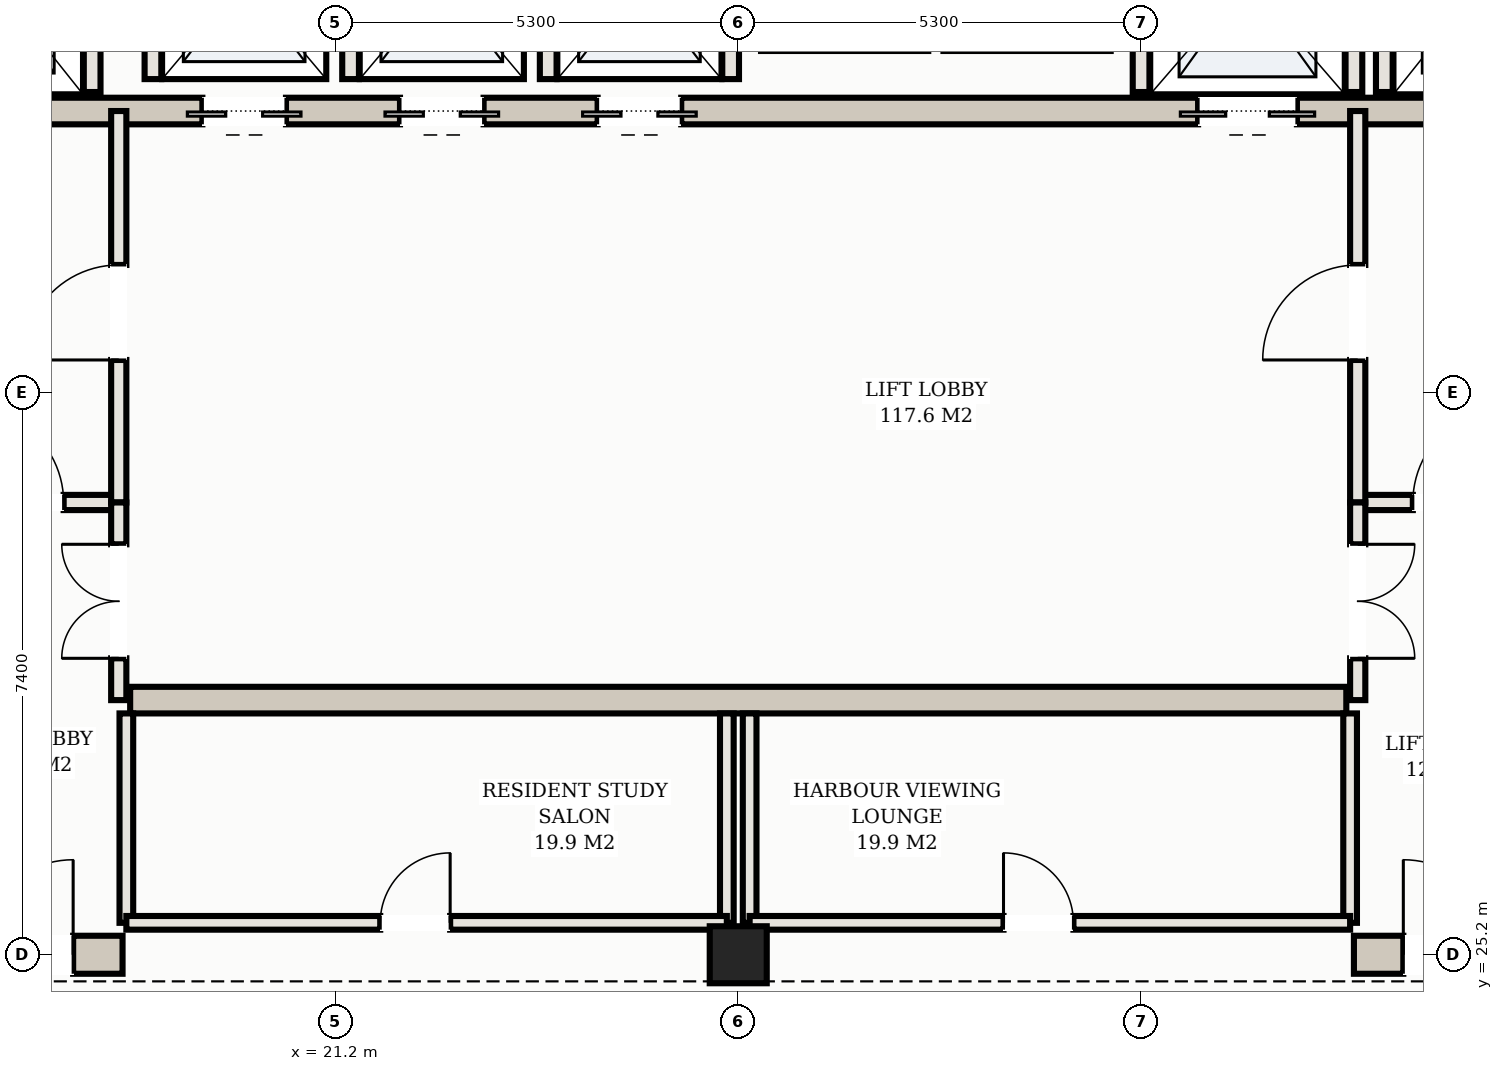
"""IFC4 building model, lengths in metres.
Left out: names, types, materials, properties, quantities, classifications, styles, units other than length and angle.
Written with IfcOpenShell. Run it as: python <this file> out.ifc"""

import sys

from ifc_helpers import new_model, si_unit, direction, frame, frame_2d, origin, origin_2d, place, context, subcontext, project, spatial, rectangle, hollow_rectangle, extrude, element, fill, save


model = new_model("IFC4")
c1 = context("Model", 3, precision=1e-05, world=origin(), true_north=direction((0.0, 1.0)))
c2 = subcontext(c1, "Body", "Model", "MODEL_VIEW")
j1 = project(units=[si_unit("LENGTHUNIT", "METRE"), si_unit("PLANEANGLEUNIT", "RADIAN")], contexts=[c1])
p1 = place(None, origin())
s1 = spatial("IfcSite", under=j1, at=p1, CompositionType="ELEMENT")
p2 = place(p1, origin())
s2 = spatial("IfcBuilding", under=s1, at=p2, CompositionType="ELEMENT")
p3 = place(p2, frame((0.0, 0.0, 219.8)))
s3 = spatial("IfcBuildingStorey", under=s2, at=p3, CompositionType="ELEMENT", Elevation=219.8)
p4 = place(p3, frame((10.35, 25.2, 0.0), z_axis=(0.0, 0.0, 1.0), x_axis=(1.0, 0.0, 0.0)))
e1 = element("IfcWall", 1, at=p4, inside=s3, PredefinedType="SHEAR", context=c2, shape_type="SweptSolid", body=[
    extrude(rectangle(XDim=8.05, YDim=0.5, at=frame_2d((4.025, 0.0))), origin(), (0.0, 0.0, 1.0), 3.11),
])
p5 = place(p4, frame((6.15, 0.0, 0.0)))
e2 = element("IfcOpeningElement", 2, at=p5, cuts=e1, PredefinedType="OPENING", context=c2, shape_type="SweptSolid", body=[
    extrude(rectangle(XDim=1.25, YDim=2.2, at=frame_2d((0.625, 1.1))), frame((0.0, 0.26, 0.0), z_axis=(0.0, -1.0, 0.0), x_axis=(1.0, 0.0, 0.0)), (0.0, 0.0, 1.0), 0.52),
])
p6 = place(p3, frame((34.6, 25.2, 0.0), z_axis=(0.0, 0.0, 1.0), x_axis=(1.0, 0.0, 0.0)))
e3 = element("IfcWall", 3, at=p6, inside=s3, PredefinedType="SHEAR", context=c2, shape_type="SweptSolid", body=[
    extrude(rectangle(XDim=8.05, YDim=0.5, at=frame_2d((4.025, 0.0))), origin(), (0.0, 0.0, 1.0), 3.11),
])
p7 = place(p6, frame((0.65, 0.0, 0.0)))
e4 = element("IfcOpeningElement", 4, at=p7, cuts=e3, PredefinedType="OPENING", context=c2, shape_type="SweptSolid", body=[
    extrude(rectangle(XDim=1.25, YDim=2.2, at=frame_2d((0.625, 1.1))), frame((0.0, 0.26, 0.0), z_axis=(0.0, -1.0, 0.0), x_axis=(1.0, 0.0, 0.0)), (0.0, 0.0, 1.0), 0.52),
])
p8 = place(p3, frame((15.5, 36.3, 0.0), z_axis=(0.0, 0.0, 1.0), x_axis=(1.0, 0.0, 0.0)))
e5 = element("IfcWall", 5, at=p8, inside=s3, PredefinedType="SHEAR", context=c2, shape_type="SweptSolid", body=[
    extrude(rectangle(XDim=22.0, YDim=0.35, at=frame_2d((11.0, 0.0))), origin(), (0.0, 0.0, 1.0), 3.11),
])
p9 = place(p8, frame((0.65, 0.0, 0.0)))
e6 = element("IfcOpeningElement", 6, at=p9, cuts=e5, PredefinedType="OPENING", context=c2, shape_type="SweptSolid", body=[
    extrude(rectangle(XDim=1.1, YDim=2.15, at=frame_2d((0.55, 1.075))), frame((0.0, 0.185, 0.0), z_axis=(0.0, -1.0, 0.0), x_axis=(1.0, 0.0, 0.0)), (0.0, 0.0, 1.0), 0.37),
])
p10 = place(p8, frame((20.25, 0.0, 0.0)))
e7 = element("IfcOpeningElement", 7, at=p10, cuts=e5, PredefinedType="OPENING", context=c2, shape_type="SweptSolid", body=[
    extrude(rectangle(XDim=1.1, YDim=2.15, at=frame_2d((0.55, 1.075))), frame((0.0, 0.185, 0.0), z_axis=(0.0, -1.0, 0.0), x_axis=(1.0, 0.0, 0.0)), (0.0, 0.0, 1.0), 0.37),
])
p11 = place(p8, frame((17.05, 0.0, 0.0)))
e8 = element("IfcOpeningElement", 8, at=p11, cuts=e5, PredefinedType="OPENING", context=c2, shape_type="SweptSolid", body=[
    extrude(rectangle(XDim=1.3, YDim=2.2, at=frame_2d((0.65, 1.1))), frame((0.0, 0.185, 0.0), z_axis=(0.0, -1.0, 0.0), x_axis=(1.0, 0.0, 0.0)), (0.0, 0.0, 1.0), 0.37),
])
p12 = place(p8, frame((3.95, 0.0, 0.0)))
e9 = element("IfcOpeningElement", 9, at=p12, cuts=e5, PredefinedType="OPENING", context=c2, shape_type="SweptSolid", body=[
    extrude(rectangle(XDim=1.1, YDim=2.15, at=frame_2d((0.55, 1.075))), frame((0.0, 0.185, 0.0), z_axis=(0.0, -1.0, 0.0), x_axis=(1.0, 0.0, 0.0)), (0.0, 0.0, 1.0), 0.37),
])
p13 = place(p8, frame((6.55, 0.0, 0.0)))
e10 = element("IfcOpeningElement", 10, at=p13, cuts=e5, PredefinedType="OPENING", context=c2, shape_type="SweptSolid", body=[
    extrude(rectangle(XDim=1.1, YDim=2.15, at=frame_2d((0.55, 1.075))), frame((0.0, 0.185, 0.0), z_axis=(0.0, -1.0, 0.0), x_axis=(1.0, 0.0, 0.0)), (0.0, 0.0, 1.0), 0.37),
])
p14 = place(p8, frame((9.15, 0.0, 0.0)))
e11 = element("IfcOpeningElement", 11, at=p14, cuts=e5, PredefinedType="OPENING", context=c2, shape_type="SweptSolid", body=[
    extrude(rectangle(XDim=1.1, YDim=2.15, at=frame_2d((0.55, 1.075))), frame((0.0, 0.185, 0.0), z_axis=(0.0, -1.0, 0.0), x_axis=(1.0, 0.0, 0.0)), (0.0, 0.0, 1.0), 0.37),
])
p15 = place(p3, frame((18.5, 28.55, 0.0), z_axis=(0.0, 0.0, 1.0), x_axis=(1.0, 0.0, 0.0)))
e12 = element("IfcWall", 12, at=p15, inside=s3, PredefinedType="SHEAR", context=c2, shape_type="SweptSolid", body=[
    extrude(rectangle(XDim=16.0, YDim=0.35, at=frame_2d((8.0, 0.0))), origin(), (0.0, 0.0, 1.0), 3.11),
])
p16 = place(p3, frame((26.5, 25.2, 0.0), z_axis=(0.0, 0.0, 1.0), x_axis=(1.0, 0.0, 0.0)))
e13 = element("IfcColumn", 13, at=p16, inside=s3, PredefinedType="COLUMN", context=c2, shape_type="SweptSolid", body=[
    extrude(hollow_rectangle(XDim=0.75, YDim=0.75, WallThickness=0.025, at=origin_2d()), origin(), (0.0, 0.0, 1.0), 3.3),
])
for number, where, z_axis, x_axis in (
    (14, (18.0, 36.55, 0.0), (0.0, 0.0, 1.0), (0.0, 1.0, 0.0)),
    (15, (35.0, 36.55, 0.0), (0.0, 0.0, 1.0), (0.0, 1.0, 0.0)),
    (16, (31.8, 36.55, 0.0), (0.0, 0.0, 1.0), (0.0, 1.0, 0.0)),
    (17, (34.6, 36.55, 0.0), (0.0, 0.0, 1.0), (0.0, 1.0, 0.0)),
):
    element("IfcWall", number, at=place(p3, frame(where, z_axis=z_axis, x_axis=x_axis)), inside=s3, PredefinedType="SOLIDWALL", context=c2, shape_type="SweptSolid", body=[
        extrude(rectangle(XDim=2.93, YDim=0.22, at=frame_2d((1.465, 0.0))), origin(), (0.0, 0.0, 1.0), 3.11),
    ])
for number, where, z_axis, x_axis in (
    (18, (18.8, 36.72, 0.0), (0.0, 0.0, 1.0), (0.0, 1.0, 0.0)),
    (19, (21.4, 36.72, 0.0), (0.0, 0.0, 1.0), (0.0, 1.0, 0.0)),
    (20, (24.0, 36.72, 0.0), (0.0, 0.0, 1.0), (0.0, 1.0, 0.0)),
    (21, (26.4, 36.72, 0.0), (0.0, 0.0, 1.0), (0.0, 1.0, 0.0)),
):
    element("IfcWall", number, at=place(p3, frame(where, z_axis=z_axis, x_axis=x_axis)), inside=s3, PredefinedType="SOLIDWALL", context=c2, shape_type="SweptSolid", body=[
        extrude(rectangle(XDim=2.56, YDim=0.22, at=frame_2d((1.28, 0.0))), origin(), (0.0, 0.0, 1.0), 3.11),
    ])
p17 = place(p3, frame((15.1, 31.15, 0.0), z_axis=(0.0, 0.0, 1.0), x_axis=(1.0, 0.0, 0.0)))
e22 = element("IfcWall", 22, at=p17, inside=s3, PredefinedType="PARTITIONING", context=c2, shape_type="SweptSolid", body=[
    extrude(rectangle(XDim=3.25, YDim=0.2, at=frame_2d((1.625, 0.0))), origin(), (0.0, 0.0, 1.0), 2.43),
])
p18 = place(p17, frame((1.275, 0.0, 0.0)))
e23 = element("IfcOpeningElement", 23, at=p18, cuts=e22, PredefinedType="OPENING", context=c2, shape_type="SweptSolid", body=[
    extrude(rectangle(XDim=1.25, YDim=2.2, at=frame_2d((0.625, 1.1))), frame((0.0, 0.11, 0.0), z_axis=(0.0, -1.0, 0.0), x_axis=(1.0, 0.0, 0.0)), (0.0, 0.0, 1.0), 0.22),
])
p19 = place(p3, frame((18.35, 31.15, 0.0), z_axis=(0.0, 0.0, 1.0), x_axis=(0.0, 1.0, 0.0)))
e24 = element("IfcWall", 24, at=p19, inside=s3, PredefinedType="PARTITIONING", context=c2, shape_type="SweptSolid", body=[
    extrude(rectangle(XDim=5.15, YDim=0.2, at=frame_2d((2.575, 0.0))), origin(), (0.0, 0.0, 1.0), 2.43),
])
p20 = place(p19, frame((1.875, 0.0, 0.0)))
e25 = element("IfcOpeningElement", 25, at=p20, cuts=e24, PredefinedType="OPENING", context=c2, shape_type="SweptSolid", body=[
    extrude(rectangle(XDim=1.25, YDim=2.2, at=frame_2d((0.625, 1.1))), frame((0.0, 0.11, 0.0), z_axis=(0.0, -1.0, 0.0), x_axis=(1.0, 0.0, 0.0)), (0.0, 0.0, 1.0), 0.22),
])
p21 = place(p3, frame((34.65, 31.15, 0.0), z_axis=(0.0, 0.0, 1.0), x_axis=(1.0, 0.0, 0.0)))
e26 = element("IfcWall", 26, at=p21, inside=s3, PredefinedType="PARTITIONING", context=c2, shape_type="SweptSolid", body=[
    extrude(rectangle(XDim=3.25, YDim=0.2, at=frame_2d((1.625, 0.0))), origin(), (0.0, 0.0, 1.0), 2.43),
])
p22 = place(p21, frame((0.725, 0.0, 0.0)))
e27 = element("IfcOpeningElement", 27, at=p22, cuts=e26, PredefinedType="OPENING", context=c2, shape_type="SweptSolid", body=[
    extrude(rectangle(XDim=1.25, YDim=2.2, at=frame_2d((0.625, 1.1))), frame((0.0, 0.11, 0.0), z_axis=(0.0, -1.0, 0.0), x_axis=(1.0, 0.0, 0.0)), (0.0, 0.0, 1.0), 0.22),
])
p23 = place(p3, frame((34.65, 31.15, 0.0), z_axis=(0.0, 0.0, 1.0), x_axis=(0.0, 1.0, 0.0)))
e28 = element("IfcWall", 28, at=p23, inside=s3, PredefinedType="PARTITIONING", context=c2, shape_type="SweptSolid", body=[
    extrude(rectangle(XDim=5.15, YDim=0.2, at=frame_2d((2.575, 0.0))), origin(), (0.0, 0.0, 1.0), 2.43),
])
p24 = place(p23, frame((1.875, 0.0, 0.0)))
e29 = element("IfcOpeningElement", 29, at=p24, cuts=e28, PredefinedType="OPENING", context=c2, shape_type="SweptSolid", body=[
    extrude(rectangle(XDim=1.25, YDim=2.2, at=frame_2d((0.625, 1.1))), frame((0.0, 0.11, 0.0), z_axis=(0.0, -1.0, 0.0), x_axis=(1.0, 0.0, 0.0)), (0.0, 0.0, 1.0), 0.22),
])
p25 = place(p3, frame((18.35, 28.55, 0.0), z_axis=(0.0, 0.0, 1.0), x_axis=(0.0, 1.0, 0.0)))
e30 = element("IfcWall", 30, at=p25, inside=s3, PredefinedType="PARTITIONING", context=c2, shape_type="SweptSolid", body=[
    extrude(rectangle(XDim=2.6, YDim=0.2, at=frame_2d((1.3, 0.0))), origin(), (0.0, 0.0, 1.0), 2.43),
])
p26 = place(p25, frame((0.55, 0.0, 0.0)))
e31 = element("IfcOpeningElement", 31, at=p26, cuts=e30, PredefinedType="OPENING", context=c2, shape_type="SweptSolid", body=[
    extrude(rectangle(XDim=1.5, YDim=2.25, at=frame_2d((0.75, 1.125))), frame((0.0, 0.11, 0.0), z_axis=(0.0, -1.0, 0.0), x_axis=(1.0, 0.0, 0.0)), (0.0, 0.0, 1.0), 0.22),
])
p27 = place(p3, frame((34.65, 28.55, 0.0), z_axis=(0.0, 0.0, 1.0), x_axis=(0.0, 1.0, 0.0)))
e32 = element("IfcWall", 32, at=p27, inside=s3, PredefinedType="PARTITIONING", context=c2, shape_type="SweptSolid", body=[
    extrude(rectangle(XDim=2.6, YDim=0.2, at=frame_2d((1.3, 0.0))), origin(), (0.0, 0.0, 1.0), 2.43),
])
p28 = place(p27, frame((0.55, 0.0, 0.0)))
e33 = element("IfcOpeningElement", 33, at=p28, cuts=e32, PredefinedType="OPENING", context=c2, shape_type="SweptSolid", body=[
    extrude(rectangle(XDim=1.5, YDim=2.25, at=frame_2d((0.75, 1.125))), frame((0.0, 0.11, 0.0), z_axis=(0.0, -1.0, 0.0), x_axis=(1.0, 0.0, 0.0)), (0.0, 0.0, 1.0), 0.22),
])
for number, where, z_axis, x_axis in (
    (34, (18.45, 25.62, 0.0), (0.0, 0.0, 1.0), (0.0, 1.0, 0.0)),
    (35, (26.35, 25.62, 0.0), (0.0, 0.0, 1.0), (0.0, 1.0, 0.0)),
):
    element("IfcWall", number, at=place(p3, frame(where, z_axis=z_axis, x_axis=x_axis)), inside=s3, PredefinedType="PARTITIONING", context=c2, shape_type="SweptSolid", body=[
        extrude(rectangle(XDim=2.755, YDim=0.18, at=frame_2d((1.377, 0.0))), origin(), (0.0, 0.0, 1.0), 2.43),
    ])
p29 = place(p3, frame((18.45, 25.62, 0.0), z_axis=(0.0, 0.0, 1.0), x_axis=(1.0, 0.0, 0.0)))
e36 = element("IfcWall", 36, at=p29, inside=s3, PredefinedType="PARTITIONING", context=c2, shape_type="SweptSolid", body=[
    extrude(rectangle(XDim=7.9, YDim=0.18, at=frame_2d((3.95, 0.0))), origin(), (0.0, 0.0, 1.0), 2.43),
])
p30 = place(p29, frame((3.34, 0.0, 0.0)))
e37 = element("IfcOpeningElement", 37, at=p30, cuts=e36, PredefinedType="OPENING", context=c2, shape_type="SweptSolid", body=[
    extrude(rectangle(XDim=0.92, YDim=2.15, at=frame_2d((0.46, 1.075))), frame((0.0, 0.1, 0.0), z_axis=(0.0, -1.0, 0.0), x_axis=(1.0, 0.0, 0.0)), (0.0, 0.0, 1.0), 0.2),
])
for number, where, z_axis, x_axis in (
    (38, (26.65, 25.62, 0.0), (0.0, 0.0, 1.0), (0.0, 1.0, 0.0)),
    (39, (34.55, 25.62, 0.0), (0.0, 0.0, 1.0), (0.0, 1.0, 0.0)),
):
    element("IfcWall", number, at=place(p3, frame(where, z_axis=z_axis, x_axis=x_axis)), inside=s3, PredefinedType="PARTITIONING", context=c2, shape_type="SweptSolid", body=[
        extrude(rectangle(XDim=2.755, YDim=0.18, at=frame_2d((1.377, 0.0))), origin(), (0.0, 0.0, 1.0), 2.43),
    ])
p31 = place(p3, frame((26.65, 25.62, 0.0), z_axis=(0.0, 0.0, 1.0), x_axis=(1.0, 0.0, 0.0)))
e40 = element("IfcWall", 40, at=p31, inside=s3, PredefinedType="PARTITIONING", context=c2, shape_type="SweptSolid", body=[
    extrude(rectangle(XDim=7.9, YDim=0.18, at=frame_2d((3.95, 0.0))), origin(), (0.0, 0.0, 1.0), 2.43),
])
p32 = place(p31, frame((3.34, 0.0, 0.0)))
e41 = element("IfcOpeningElement", 41, at=p32, cuts=e40, PredefinedType="OPENING", context=c2, shape_type="SweptSolid", body=[
    extrude(rectangle(XDim=0.92, YDim=2.15, at=frame_2d((0.46, 1.075))), frame((0.0, 0.1, 0.0), z_axis=(0.0, -1.0, 0.0), x_axis=(1.0, 0.0, 0.0)), (0.0, 0.0, 1.0), 0.2),
])
p33 = place(p11, frame((1.3, 0.0, 0.0), z_axis=(0.0, 0.0, 1.0), x_axis=(-1.0, 0.0, 0.0)))
e42 = element("IfcDoor", 42, at=p33, inside=s3, OperationType="DOUBLE_DOOR_SLIDING", PredefinedType="DOOR", context=c2, shape_type="SweptSolid", body=[
    extrude(rectangle(XDim=1.3, YDim=2.2, at=frame_2d((0.65, 1.1))), frame((0.0, 0.025, 0.0), z_axis=(0.0, -1.0, 0.0), x_axis=(1.0, 0.0, 0.0)), (0.0, 0.0, 1.0), 0.05),
])
fill(e8, e42)
p34 = place(p12, frame((1.1, 0.0, 0.0), z_axis=(0.0, 0.0, 1.0), x_axis=(-1.0, 0.0, 0.0)))
e43 = element("IfcDoor", 43, at=p34, inside=s3, OperationType="DOUBLE_DOOR_SLIDING", PredefinedType="DOOR", context=c2, shape_type="SweptSolid", body=[
    extrude(rectangle(XDim=1.1, YDim=2.15, at=frame_2d((0.55, 1.075))), frame((0.0, 0.025, 0.0), z_axis=(0.0, -1.0, 0.0), x_axis=(1.0, 0.0, 0.0)), (0.0, 0.0, 1.0), 0.05),
])
fill(e9, e43)
p35 = place(p13, frame((1.1, 0.0, 0.0), z_axis=(0.0, 0.0, 1.0), x_axis=(-1.0, 0.0, 0.0)))
e44 = element("IfcDoor", 44, at=p35, inside=s3, OperationType="DOUBLE_DOOR_SLIDING", PredefinedType="DOOR", context=c2, shape_type="SweptSolid", body=[
    extrude(rectangle(XDim=1.1, YDim=2.15, at=frame_2d((0.55, 1.075))), frame((0.0, 0.025, 0.0), z_axis=(0.0, -1.0, 0.0), x_axis=(1.0, 0.0, 0.0)), (0.0, 0.0, 1.0), 0.05),
])
fill(e10, e44)
p36 = place(p14, frame((1.1, 0.0, 0.0), z_axis=(0.0, 0.0, 1.0), x_axis=(-1.0, 0.0, 0.0)))
e45 = element("IfcDoor", 45, at=p36, inside=s3, OperationType="DOUBLE_DOOR_SLIDING", PredefinedType="DOOR", context=c2, shape_type="SweptSolid", body=[
    extrude(rectangle(XDim=1.1, YDim=2.15, at=frame_2d((0.55, 1.075))), frame((0.0, 0.025, 0.0), z_axis=(0.0, -1.0, 0.0), x_axis=(1.0, 0.0, 0.0)), (0.0, 0.0, 1.0), 0.05),
])
fill(e11, e45)
p37 = place(p5, origin())
e46 = element("IfcDoor", 46, at=p37, inside=s3, OperationType="SINGLE_SWING_RIGHT", PredefinedType="DOOR", context=c2, shape_type="SweptSolid", body=[
    extrude(rectangle(XDim=1.25, YDim=2.2, at=frame_2d((0.625, 1.1))), frame((0.0, 0.025, 0.0), z_axis=(0.0, -1.0, 0.0), x_axis=(1.0, 0.0, 0.0)), (0.0, 0.0, 1.0), 0.05),
])
fill(e2, e46)
p38 = place(p7, origin())
e47 = element("IfcDoor", 47, at=p38, inside=s3, OperationType="SINGLE_SWING_LEFT", PredefinedType="DOOR", context=c2, shape_type="SweptSolid", body=[
    extrude(rectangle(XDim=1.25, YDim=2.2, at=frame_2d((0.625, 1.1))), frame((0.0, 0.025, 0.0), z_axis=(0.0, -1.0, 0.0), x_axis=(1.0, 0.0, 0.0)), (0.0, 0.0, 1.0), 0.05),
])
fill(e4, e47)
p39 = place(p18, origin())
e48 = element("IfcDoor", 48, at=p39, inside=s3, OperationType="SINGLE_SWING_LEFT", PredefinedType="DOOR", context=c2, shape_type="SweptSolid", body=[
    extrude(rectangle(XDim=1.25, YDim=2.2, at=frame_2d((0.625, 1.1))), frame((0.0, 0.025, 0.0), z_axis=(0.0, -1.0, 0.0), x_axis=(1.0, 0.0, 0.0)), (0.0, 0.0, 1.0), 0.05),
])
fill(e23, e48)
p40 = place(p20, origin())
e49 = element("IfcDoor", 49, at=p40, inside=s3, OperationType="SINGLE_SWING_LEFT", PredefinedType="DOOR", context=c2, shape_type="SweptSolid", body=[
    extrude(rectangle(XDim=1.25, YDim=2.2, at=frame_2d((0.625, 1.1))), frame((0.0, 0.025, 0.0), z_axis=(0.0, -1.0, 0.0), x_axis=(1.0, 0.0, 0.0)), (0.0, 0.0, 1.0), 0.05),
])
fill(e25, e49)
p41 = place(p22, origin())
e50 = element("IfcDoor", 50, at=p41, inside=s3, OperationType="SINGLE_SWING_RIGHT", PredefinedType="DOOR", context=c2, shape_type="SweptSolid", body=[
    extrude(rectangle(XDim=1.25, YDim=2.2, at=frame_2d((0.625, 1.1))), frame((0.0, 0.025, 0.0), z_axis=(0.0, -1.0, 0.0), x_axis=(1.0, 0.0, 0.0)), (0.0, 0.0, 1.0), 0.05),
])
fill(e27, e50)
p42 = place(p24, origin())
e51 = element("IfcDoor", 51, at=p42, inside=s3, OperationType="SINGLE_SWING_LEFT", PredefinedType="DOOR", context=c2, shape_type="SweptSolid", body=[
    extrude(rectangle(XDim=1.25, YDim=2.2, at=frame_2d((0.625, 1.1))), frame((0.0, 0.025, 0.0), z_axis=(0.0, -1.0, 0.0), x_axis=(1.0, 0.0, 0.0)), (0.0, 0.0, 1.0), 0.05),
])
fill(e29, e51)
p43 = place(p26, origin())
e52 = element("IfcDoor", 52, at=p43, inside=s3, OperationType="DOUBLE_DOOR_SINGLE_SWING", PredefinedType="DOOR", context=c2, shape_type="SweptSolid", body=[
    extrude(rectangle(XDim=1.5, YDim=2.25, at=frame_2d((0.75, 1.125))), frame((0.0, 0.025, 0.0), z_axis=(0.0, -1.0, 0.0), x_axis=(1.0, 0.0, 0.0)), (0.0, 0.0, 1.0), 0.05),
])
fill(e31, e52)
p44 = place(p28, frame((1.5, 0.0, 0.0), z_axis=(0.0, 0.0, 1.0), x_axis=(-1.0, 0.0, 0.0)))
e53 = element("IfcDoor", 53, at=p44, inside=s3, OperationType="DOUBLE_DOOR_SINGLE_SWING", PredefinedType="DOOR", context=c2, shape_type="SweptSolid", body=[
    extrude(rectangle(XDim=1.5, YDim=2.25, at=frame_2d((0.75, 1.125))), frame((0.0, 0.025, 0.0), z_axis=(0.0, -1.0, 0.0), x_axis=(1.0, 0.0, 0.0)), (0.0, 0.0, 1.0), 0.05),
])
fill(e33, e53)
p45 = place(p30, origin())
e54 = element("IfcDoor", 54, at=p45, inside=s3, OperationType="SINGLE_SWING_RIGHT", PredefinedType="DOOR", context=c2, shape_type="SweptSolid", body=[
    extrude(rectangle(XDim=0.92, YDim=2.15, at=frame_2d((0.46, 1.075))), frame((0.0, 0.025, 0.0), z_axis=(0.0, -1.0, 0.0), x_axis=(1.0, 0.0, 0.0)), (0.0, 0.0, 1.0), 0.05),
])
fill(e37, e54)
p46 = place(p32, origin())
e55 = element("IfcDoor", 55, at=p46, inside=s3, OperationType="SINGLE_SWING_LEFT", PredefinedType="DOOR", context=c2, shape_type="SweptSolid", body=[
    extrude(rectangle(XDim=0.92, YDim=2.15, at=frame_2d((0.46, 1.075))), frame((0.0, 0.025, 0.0), z_axis=(0.0, -1.0, 0.0), x_axis=(1.0, 0.0, 0.0)), (0.0, 0.0, 1.0), 0.05),
])
fill(e41, e55)
save(model, sys.argv[1])
